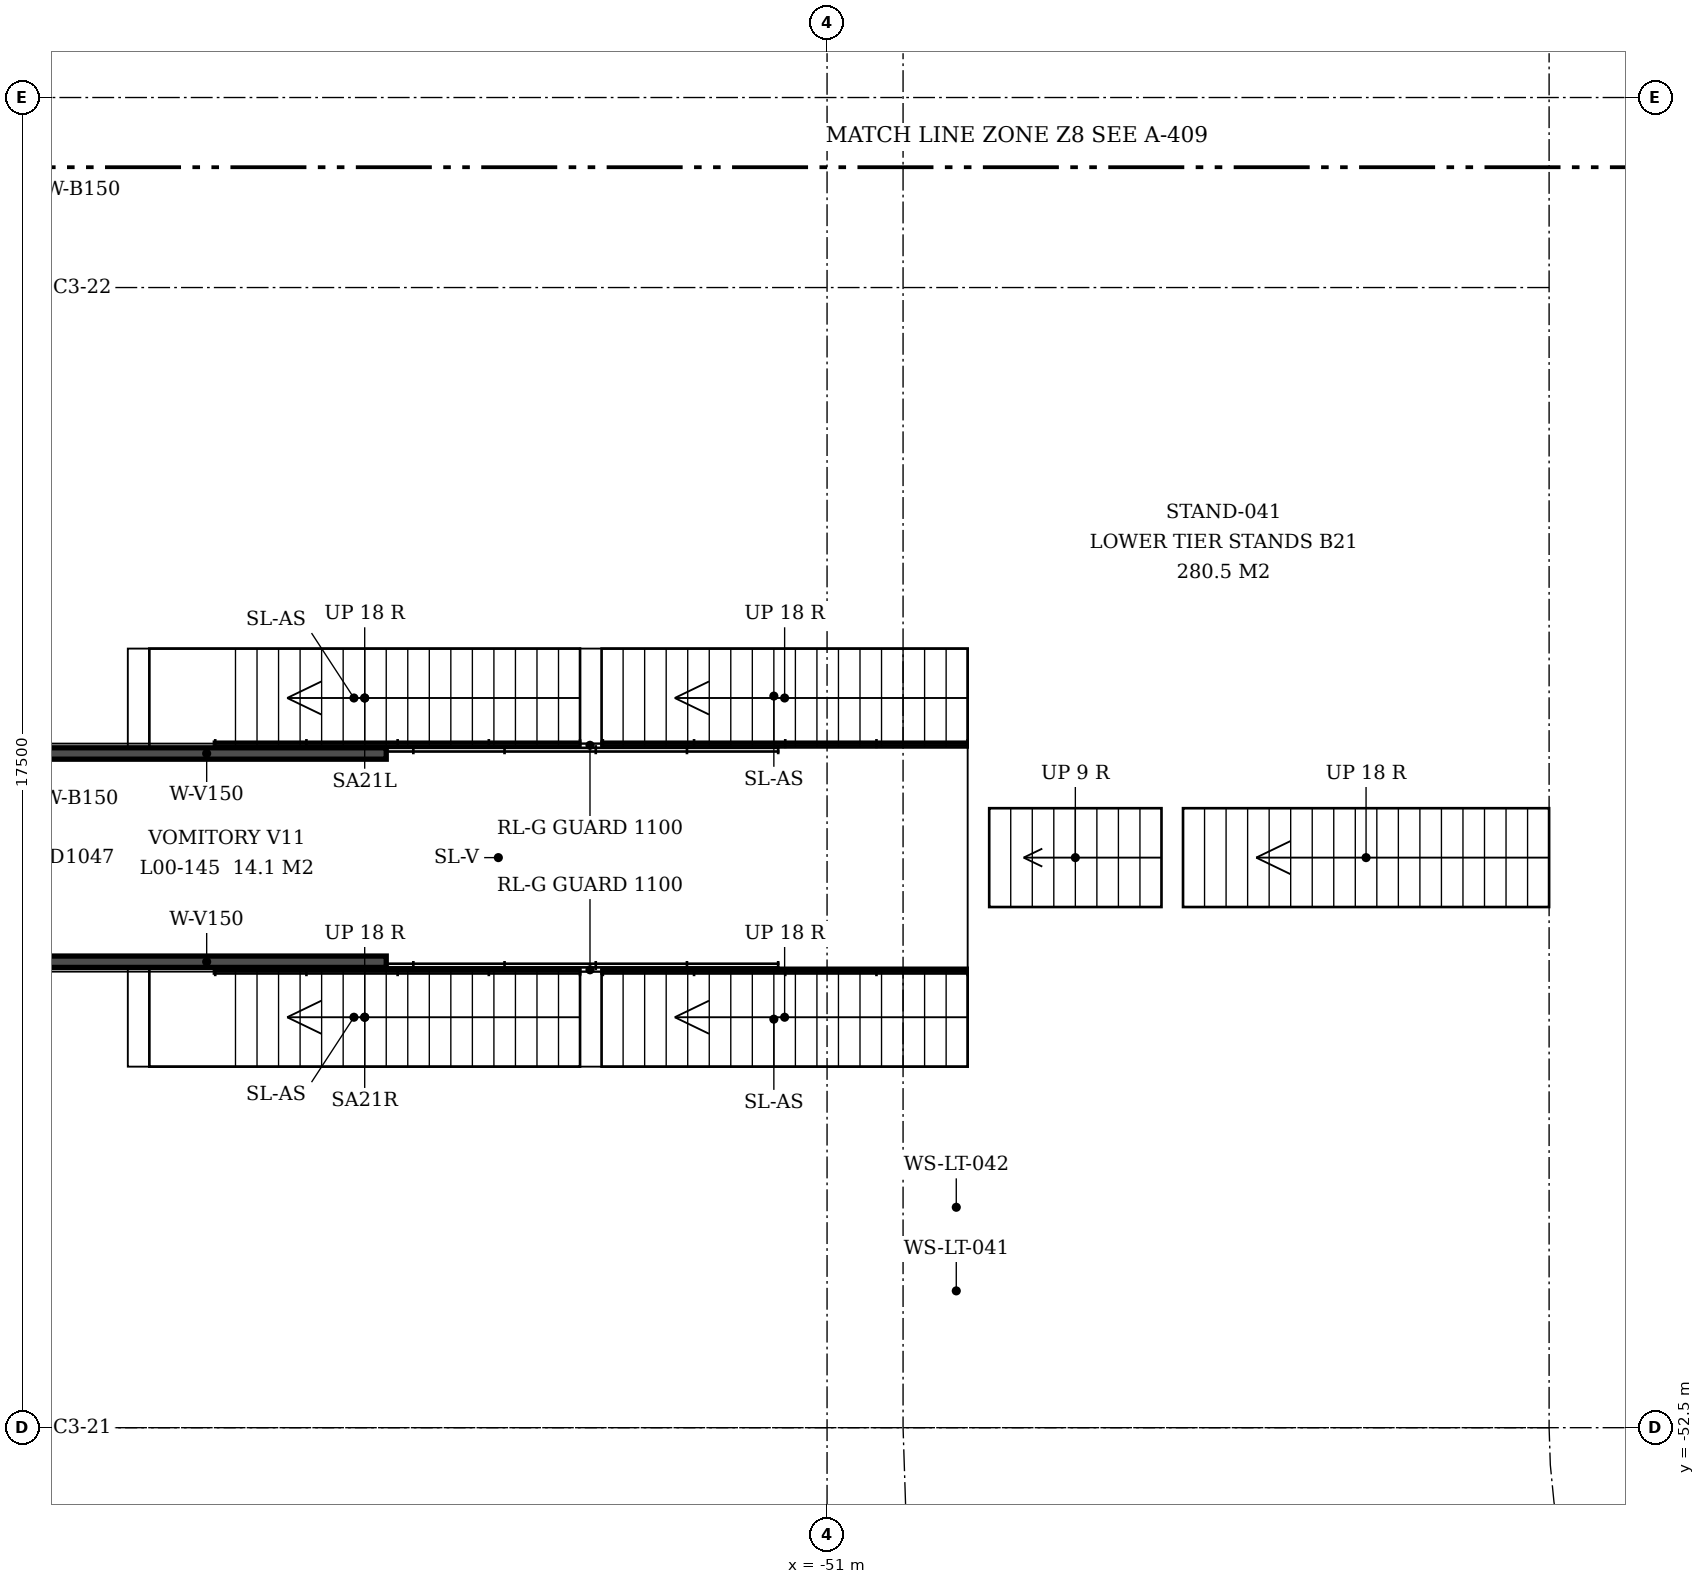
"""IFC4 building model, lengths in metres.
Left out: names, types, materials, properties, quantities, classifications, styles, units other than length and angle.
Written with IfcOpenShell. Run it as: python <this file> out.ifc"""

import sys

from ifc_helpers import new_model, si_unit, direction, frame, frame_2d, origin, place, context, subcontext, project, spatial, rectangle, extrude, element, save


model = new_model("IFC4")
c1 = context("Model", 3, precision=1e-05, world=origin(), true_north=direction((0.0, 1.0)))
c2 = subcontext(c1, "Body", "Model", "MODEL_VIEW")
j1 = project(units=[si_unit("LENGTHUNIT", "METRE"), si_unit("PLANEANGLEUNIT", "RADIAN")], contexts=[c1])
p1 = place(None, origin())
s1 = spatial("IfcSite", under=j1, at=p1, CompositionType="ELEMENT")
p2 = place(p1, origin())
s2 = spatial("IfcBuilding", under=s1, at=p2, CompositionType="ELEMENT")
p3 = place(p2, origin())
s3 = spatial("IfcBuildingStorey", under=s2, at=p3, CompositionType="ELEMENT", Elevation=0.0)
p4 = place(p3, frame((-59.589, -62.612, 0.0), z_axis=(0.0, 0.0, 1.0), x_axis=(-0.195091913691, 0.980784963798, 0.0)))
e1 = element("IfcWall", 1, at=p4, inside=s3, PredefinedType="SOLIDWALL", context=c2, shape_type="SweptSolid", body=[
    extrude(rectangle(XDim=9.902, YDim=0.15, at=frame_2d((4.951, 0.0))), origin(), (0.0, 0.0, 1.0), 3.0),
])
for number, where, z_axis, x_axis in (
    (2, (-56.8, -43.63, 0.0), (0.0, 0.0, 1.0), (-1.0, 0.0, 0.0)),
    (3, (-56.8, -46.37, 0.0), (0.0, 0.0, 1.0), (-1.0, 0.0, 0.0)),
):
    element("IfcWall", number, at=place(p3, frame(where, z_axis=z_axis, x_axis=x_axis)), inside=s3, PredefinedType="SOLIDWALL", context=c2, shape_type="SweptSolid", body=[
        extrude(rectangle(XDim=4.725, YDim=0.15, at=frame_2d((2.362, 0.0))), origin(), (0.0, 0.0, 1.0), 2.75),
    ])
save(model, sys.argv[1])
